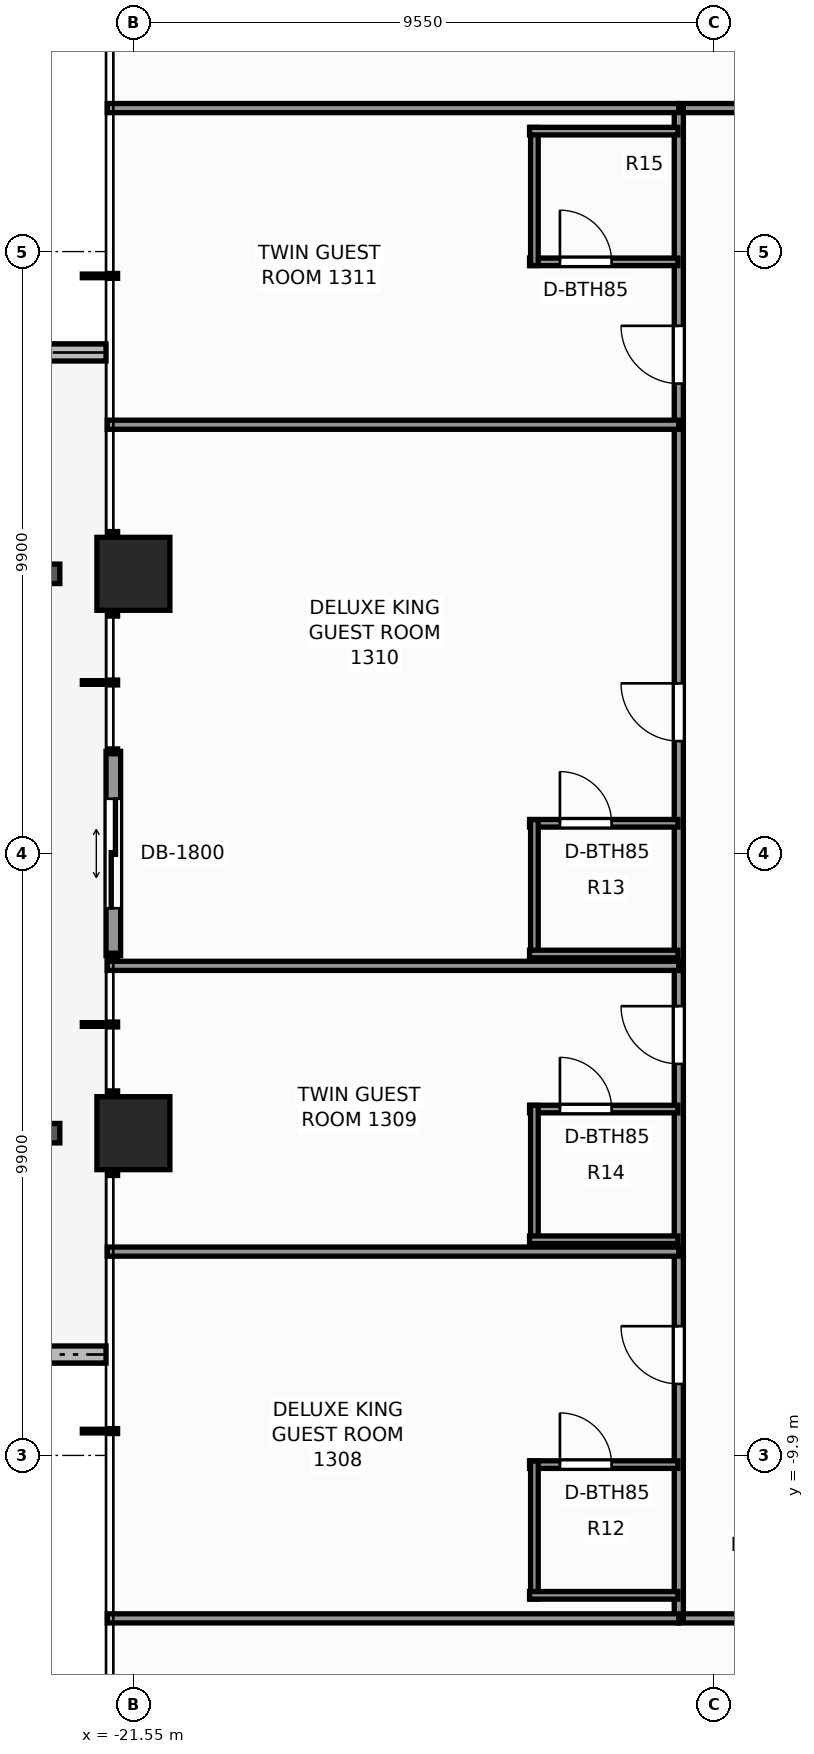
"""IFC4 building model, lengths in metres.
Left out: names, types, materials, properties, quantities, classifications, styles, units other than length and angle.
Written with IfcOpenShell. Run it as: python <this file> out.ifc"""

import sys

from ifc_helpers import new_model, si_unit, direction, frame, frame_2d, origin, origin_2d, place, context, subcontext, project, spatial, rectangle, extrude, element, fill, save


model = new_model("IFC4")
c1 = context("Model", 3, precision=1e-05, world=origin(), true_north=direction((0.0, 1.0)))
c2 = subcontext(c1, "Body", "Model", "MODEL_VIEW")
j1 = project(units=[si_unit("LENGTHUNIT", "METRE"), si_unit("PLANEANGLEUNIT", "RADIAN")], contexts=[c1])
p1 = place(None, origin())
s1 = spatial("IfcSite", under=j1, at=p1, CompositionType="ELEMENT")
p2 = place(p1, origin())
s2 = spatial("IfcBuilding", under=s1, at=p2, CompositionType="ELEMENT")
p3 = place(p2, frame((0.0, 0.0, 46.9)))
s3 = spatial("IfcBuildingStorey", under=s2, at=p3, CompositionType="ELEMENT", Elevation=46.9)
for number, where, z_axis, x_axis in (
    (1, (-21.55, -4.6, 0.0), (0.0, 0.0, 1.0), (1.0, 0.0, 0.0)),
    (2, (-21.55, 4.6, 0.0), (0.0, 0.0, 1.0), (1.0, 0.0, 0.0)),
):
    element("IfcColumn", number, at=place(p3, frame(where, z_axis=z_axis, x_axis=x_axis)), inside=s3, PredefinedType="COLUMN", context=c2, shape_type="SweptSolid", body=[
        extrude(rectangle(XDim=1.2, YDim=1.2, at=origin_2d()), origin(), (0.0, 0.0, 1.0), 3.3),
    ])
p4 = place(p3, frame((-25.214, -8.24, -0.06), z_axis=(0.0, 0.0, 1.0), x_axis=(1.0, 0.0, 0.0)))
e3 = element("IfcWall", 3, at=p4, inside=s3, PredefinedType="PARAPET", context=c2, shape_type="SweptSolid", body=[
    extrude(rectangle(XDim=3.214, YDim=0.28, at=frame_2d((1.607, 0.0))), origin(), (0.0, 0.0, 1.0), 0.42),
])
p5 = place(p3, frame((-22.0, 8.24, -0.06), z_axis=(0.0, 0.0, 1.0), x_axis=(-1.0, 0.0, 0.0)))
e4 = element("IfcWall", 4, at=p5, inside=s3, PredefinedType="PARAPET", context=c2, shape_type="SweptSolid", body=[
    extrude(rectangle(XDim=3.42, YDim=0.28, at=frame_2d((1.71, 0.0))), origin(), (0.0, 0.0, 1.0), 0.42),
])
p6 = place(p3, frame((-21.88, -1.68, 0.0), z_axis=(0.0, 0.0, 1.0), x_axis=(0.0, 1.0, 0.0)))
e5 = element("IfcWall", 5, at=p6, inside=s3, PredefinedType="STANDARD", context=c2, shape_type="SweptSolid", body=[
    extrude(rectangle(XDim=3.36, YDim=0.24, at=frame_2d((1.68, 0.0))), origin(), (0.0, 0.0, 1.0), 3.06),
])
p7 = place(p6, frame((0.78, 0.0, 0.0)))
e6 = element("IfcOpeningElement", 6, at=p7, cuts=e5, PredefinedType="OPENING", context=c2, shape_type="SweptSolid", body=[
    extrude(rectangle(XDim=1.8, YDim=2.2, at=frame_2d((0.9, 1.1))), frame((0.0, 0.13, 0.0), z_axis=(0.0, -1.0, 0.0), x_axis=(1.0, 0.0, 0.0)), (0.0, 0.0, 1.0), 0.26),
])
p8 = place(p3, frame((-12.58, -12.58, 0.0), z_axis=(0.0, 0.0, 1.0), x_axis=(1.0, 0.0, 0.0)))
e7 = element("IfcWall", 7, at=p8, inside=s3, PredefinedType="PARTITIONING", context=c2, shape_type="SweptSolid", body=[
    extrude(rectangle(XDim=25.0, YDim=0.15, at=frame_2d((12.5, 0.0))), origin(), (0.0, 0.0, 1.0), 2.272),
])
p9 = place(p8, frame((3.118, 0.0, 0.0)))
e8 = element("IfcOpeningElement", 8, at=p9, cuts=e7, PredefinedType="OPENING", context=c2, shape_type="SweptSolid", body=[
    extrude(rectangle(XDim=0.9, YDim=2.06, at=frame_2d((0.45, 1.03))), frame((0.0, 0.085, 0.0), z_axis=(0.0, -1.0, 0.0), x_axis=(1.0, 0.0, 0.0)), (0.0, 0.0, 1.0), 0.17),
])
p10 = place(p8, frame((5.454, 0.0, 0.0)))
e9 = element("IfcOpeningElement", 9, at=p10, cuts=e7, PredefinedType="OPENING", context=c2, shape_type="SweptSolid", body=[
    extrude(rectangle(XDim=0.9, YDim=2.06, at=frame_2d((0.45, 1.03))), frame((0.0, 0.085, 0.0), z_axis=(0.0, -1.0, 0.0), x_axis=(1.0, 0.0, 0.0)), (0.0, 0.0, 1.0), 0.17),
])
p11 = place(p8, frame((14.16, 0.0, 0.0)))
e10 = element("IfcOpeningElement", 10, at=p11, cuts=e7, PredefinedType="OPENING", context=c2, shape_type="SweptSolid", body=[
    extrude(rectangle(XDim=0.9, YDim=2.06, at=frame_2d((0.45, 1.03))), frame((0.0, 0.085, 0.0), z_axis=(0.0, -1.0, 0.0), x_axis=(1.0, 0.0, 0.0)), (0.0, 0.0, 1.0), 0.17),
])
p12 = place(p8, frame((20.541, 0.0, 0.0)))
e11 = element("IfcOpeningElement", 11, at=p12, cuts=e7, PredefinedType="OPENING", context=c2, shape_type="SweptSolid", body=[
    extrude(rectangle(XDim=0.9, YDim=2.06, at=frame_2d((0.45, 1.03))), frame((0.0, 0.085, 0.0), z_axis=(0.0, -1.0, 0.0), x_axis=(1.0, 0.0, 0.0)), (0.0, 0.0, 1.0), 0.17),
])
p13 = place(p3, frame((-12.58, 12.26, 0.0), z_axis=(0.0, 0.0, 1.0), x_axis=(1.0, 0.0, 0.0)))
e12 = element("IfcWall", 12, at=p13, inside=s3, PredefinedType="PARTITIONING", context=c2, shape_type="SweptSolid", body=[
    extrude(rectangle(XDim=25.0, YDim=0.15, at=frame_2d((12.5, 0.0))), origin(), (0.0, 0.0, 1.0), 2.272),
])
p14 = place(p13, frame((3.379, 0.0, 0.0)))
e13 = element("IfcOpeningElement", 13, at=p14, cuts=e12, PredefinedType="OPENING", context=c2, shape_type="SweptSolid", body=[
    extrude(rectangle(XDim=0.9, YDim=2.06, at=frame_2d((0.45, 1.03))), frame((0.0, 0.085, 0.0), z_axis=(0.0, -1.0, 0.0), x_axis=(1.0, 0.0, 0.0)), (0.0, 0.0, 1.0), 0.17),
])
p15 = place(p13, frame((10.1, 0.0, 0.0)))
e14 = element("IfcOpeningElement", 14, at=p15, cuts=e12, PredefinedType="OPENING", context=c2, shape_type="SweptSolid", body=[
    extrude(rectangle(XDim=0.9, YDim=2.06, at=frame_2d((0.45, 1.03))), frame((0.0, 0.085, 0.0), z_axis=(0.0, -1.0, 0.0), x_axis=(1.0, 0.0, 0.0)), (0.0, 0.0, 1.0), 0.17),
])
p16 = place(p13, frame((19.665, 0.0, 0.0)))
e15 = element("IfcOpeningElement", 15, at=p16, cuts=e12, PredefinedType="OPENING", context=c2, shape_type="SweptSolid", body=[
    extrude(rectangle(XDim=0.9, YDim=2.06, at=frame_2d((0.45, 1.03))), frame((0.0, 0.085, 0.0), z_axis=(0.0, -1.0, 0.0), x_axis=(1.0, 0.0, 0.0)), (0.0, 0.0, 1.0), 0.17),
])
p17 = place(p3, frame((-12.58, -12.58, 0.0), z_axis=(0.0, 0.0, 1.0), x_axis=(0.0, 1.0, 0.0)))
e16 = element("IfcWall", 16, at=p17, inside=s3, PredefinedType="PARTITIONING", context=c2, shape_type="SweptSolid", body=[
    extrude(rectangle(XDim=24.84, YDim=0.15, at=frame_2d((12.42, 0.0))), origin(), (0.0, 0.0, 1.0), 2.272),
])
p18 = place(p17, frame((3.856, 0.0, 0.0)))
e17 = element("IfcOpeningElement", 17, at=p18, cuts=e16, PredefinedType="OPENING", context=c2, shape_type="SweptSolid", body=[
    extrude(rectangle(XDim=0.95, YDim=2.06, at=frame_2d((0.475, 1.03))), frame((0.0, 0.085, 0.0), z_axis=(0.0, -1.0, 0.0), x_axis=(1.0, 0.0, 0.0)), (0.0, 0.0, 1.0), 0.17),
])
p19 = place(p17, frame((9.119, 0.0, 0.0)))
e18 = element("IfcOpeningElement", 18, at=p19, cuts=e16, PredefinedType="OPENING", context=c2, shape_type="SweptSolid", body=[
    extrude(rectangle(XDim=0.95, YDim=2.06, at=frame_2d((0.475, 1.03))), frame((0.0, 0.085, 0.0), z_axis=(0.0, -1.0, 0.0), x_axis=(1.0, 0.0, 0.0)), (0.0, 0.0, 1.0), 0.17),
])
p20 = place(p17, frame((14.428, 0.0, 0.0)))
e19 = element("IfcOpeningElement", 19, at=p20, cuts=e16, PredefinedType="OPENING", context=c2, shape_type="SweptSolid", body=[
    extrude(rectangle(XDim=0.95, YDim=2.06, at=frame_2d((0.475, 1.03))), frame((0.0, 0.085, 0.0), z_axis=(0.0, -1.0, 0.0), x_axis=(1.0, 0.0, 0.0)), (0.0, 0.0, 1.0), 0.17),
])
p21 = place(p17, frame((20.309, 0.0, 0.0)))
e20 = element("IfcOpeningElement", 20, at=p21, cuts=e16, PredefinedType="OPENING", context=c2, shape_type="SweptSolid", body=[
    extrude(rectangle(XDim=0.95, YDim=2.06, at=frame_2d((0.475, 1.03))), frame((0.0, 0.085, 0.0), z_axis=(0.0, -1.0, 0.0), x_axis=(1.0, 0.0, 0.0)), (0.0, 0.0, 1.0), 0.17),
])
for number, where, z_axis, x_axis in (
    (21, (-21.98, -12.58, 0.0), (0.0, 0.0, 1.0), (1.0, 0.0, 0.0)),
    (22, (-21.98, 12.26, 0.0), (0.0, 0.0, 1.0), (1.0, 0.0, 0.0)),
):
    element("IfcWall", number, at=place(p3, frame(where, z_axis=z_axis, x_axis=x_axis)), inside=s3, PredefinedType="PARTITIONING", context=c2, shape_type="SweptSolid", body=[
        extrude(rectangle(XDim=9.4, YDim=0.15, at=frame_2d((4.7, 0.0))), origin(), (0.0, 0.0, 1.0), 2.272),
    ])
p22 = place(p3, frame((-21.98, -6.548, 0.0), z_axis=(0.0, 0.0, 1.0), x_axis=(1.0, 0.0, 0.0)))
e23 = element("IfcWall", 23, at=p22, inside=s3, PredefinedType="PARTITIONING", context=c2, shape_type="SweptSolid", body=[
    extrude(rectangle(XDim=9.4, YDim=0.15, at=frame_2d((4.7, 0.0))), origin(), (0.0, 0.0, 1.0), 2.429),
])
p23 = place(p3, frame((-15.035, -10.051, 0.0), z_axis=(0.0, 0.0, 1.0), x_axis=(1.0, 0.0, 0.0)))
e24 = element("IfcWall", 24, at=p23, inside=s3, PredefinedType="PARTITIONING", context=c2, shape_type="SweptSolid", body=[
    extrude(rectangle(XDim=2.44, YDim=0.125, at=frame_2d((1.22, 0.0))), origin(), (0.0, 0.0, 1.0), 3.06),
])
p24 = place(p23, frame((0.5, 0.0, 0.0)))
e25 = element("IfcOpeningElement", 25, at=p24, cuts=e24, PredefinedType="OPENING", context=c2, shape_type="SweptSolid", body=[
    extrude(rectangle(XDim=0.85, YDim=2.03, at=frame_2d((0.425, 1.015))), frame((0.0, 0.073, 0.0), z_axis=(0.0, -1.0, 0.0), x_axis=(1.0, 0.0, 0.0)), (0.0, 0.0, 1.0), 0.145),
])
p25 = place(p3, frame((-14.955, -12.261, 0.0), z_axis=(0.0, 0.0, 1.0), x_axis=(0.0, 1.0, 0.0)))
e26 = element("IfcWall", 26, at=p25, inside=s3, PredefinedType="PARTITIONING", context=c2, shape_type="SweptSolid", body=[
    extrude(rectangle(XDim=2.27, YDim=0.125, at=frame_2d((1.135, 0.0))), origin(), (0.0, 0.0, 1.0), 2.272),
])
p26 = place(p3, frame((-15.035, -12.201, 0.0), z_axis=(0.0, 0.0, 1.0), x_axis=(1.0, 0.0, 0.0)))
e27 = element("IfcWall", 27, at=p26, inside=s3, PredefinedType="PARTITIONING", context=c2, shape_type="SweptSolid", body=[
    extrude(rectangle(XDim=2.44, YDim=0.125, at=frame_2d((1.22, 0.0))), origin(), (0.0, 0.0, 1.0), 3.06),
])
p27 = place(p3, frame((-21.98, -1.848, 0.0), z_axis=(0.0, 0.0, 1.0), x_axis=(1.0, 0.0, 0.0)))
e28 = element("IfcWall", 28, at=p27, inside=s3, PredefinedType="PARTITIONING", context=c2, shape_type="SweptSolid", body=[
    extrude(rectangle(XDim=9.4, YDim=0.15, at=frame_2d((4.7, 0.0))), origin(), (0.0, 0.0, 1.0), 2.429),
])
p28 = place(p3, frame((-15.035, -4.203, 0.0), z_axis=(0.0, 0.0, 1.0), x_axis=(1.0, 0.0, 0.0)))
e29 = element("IfcWall", 29, at=p28, inside=s3, PredefinedType="PARTITIONING", context=c2, shape_type="SweptSolid", body=[
    extrude(rectangle(XDim=2.44, YDim=0.125, at=frame_2d((1.22, 0.0))), origin(), (0.0, 0.0, 1.0), 3.06),
])
p29 = place(p28, frame((0.5, 0.0, 0.0)))
e30 = element("IfcOpeningElement", 30, at=p29, cuts=e29, PredefinedType="OPENING", context=c2, shape_type="SweptSolid", body=[
    extrude(rectangle(XDim=0.85, YDim=2.03, at=frame_2d((0.425, 1.015))), frame((0.0, 0.073, 0.0), z_axis=(0.0, -1.0, 0.0), x_axis=(1.0, 0.0, 0.0)), (0.0, 0.0, 1.0), 0.145),
])
p30 = place(p3, frame((-14.955, -6.413, 0.0), z_axis=(0.0, 0.0, 1.0), x_axis=(0.0, 1.0, 0.0)))
e31 = element("IfcWall", 31, at=p30, inside=s3, PredefinedType="PARTITIONING", context=c2, shape_type="SweptSolid", body=[
    extrude(rectangle(XDim=2.27, YDim=0.125, at=frame_2d((1.135, 0.0))), origin(), (0.0, 0.0, 1.0), 2.272),
])
p31 = place(p3, frame((-15.035, -6.353, 0.0), z_axis=(0.0, 0.0, 1.0), x_axis=(1.0, 0.0, 0.0)))
e32 = element("IfcWall", 32, at=p31, inside=s3, PredefinedType="PARTITIONING", context=c2, shape_type="SweptSolid", body=[
    extrude(rectangle(XDim=2.44, YDim=0.125, at=frame_2d((1.22, 0.0))), origin(), (0.0, 0.0, 1.0), 3.06),
])
p32 = place(p3, frame((-21.98, 7.052, 0.0), z_axis=(0.0, 0.0, 1.0), x_axis=(1.0, 0.0, 0.0)))
e33 = element("IfcWall", 33, at=p32, inside=s3, PredefinedType="PARTITIONING", context=c2, shape_type="SweptSolid", body=[
    extrude(rectangle(XDim=9.4, YDim=0.15, at=frame_2d((4.7, 0.0))), origin(), (0.0, 0.0, 1.0), 2.429),
])
p33 = place(p3, frame((-15.035, 0.497, 0.0), z_axis=(0.0, 0.0, 1.0), x_axis=(1.0, 0.0, 0.0)))
e34 = element("IfcWall", 34, at=p33, inside=s3, PredefinedType="PARTITIONING", context=c2, shape_type="SweptSolid", body=[
    extrude(rectangle(XDim=2.44, YDim=0.125, at=frame_2d((1.22, 0.0))), origin(), (0.0, 0.0, 1.0), 3.06),
])
p34 = place(p33, frame((0.5, 0.0, 0.0)))
e35 = element("IfcOpeningElement", 35, at=p34, cuts=e34, PredefinedType="OPENING", context=c2, shape_type="SweptSolid", body=[
    extrude(rectangle(XDim=0.85, YDim=2.03, at=frame_2d((0.425, 1.015))), frame((0.0, 0.073, 0.0), z_axis=(0.0, -1.0, 0.0), x_axis=(1.0, 0.0, 0.0)), (0.0, 0.0, 1.0), 0.145),
])
p35 = place(p3, frame((-14.955, -1.713, 0.0), z_axis=(0.0, 0.0, 1.0), x_axis=(0.0, 1.0, 0.0)))
e36 = element("IfcWall", 36, at=p35, inside=s3, PredefinedType="PARTITIONING", context=c2, shape_type="SweptSolid", body=[
    extrude(rectangle(XDim=2.27, YDim=0.125, at=frame_2d((1.135, 0.0))), origin(), (0.0, 0.0, 1.0), 2.585),
])
p36 = place(p3, frame((-15.035, -1.653, 0.0), z_axis=(0.0, 0.0, 1.0), x_axis=(1.0, 0.0, 0.0)))
e37 = element("IfcWall", 37, at=p36, inside=s3, PredefinedType="PARTITIONING", context=c2, shape_type="SweptSolid", body=[
    extrude(rectangle(XDim=2.44, YDim=0.125, at=frame_2d((1.22, 0.0))), origin(), (0.0, 0.0, 1.0), 3.06),
])
p37 = place(p3, frame((-15.035, 9.731, 0.0), z_axis=(0.0, 0.0, 1.0), x_axis=(1.0, 0.0, 0.0)))
e38 = element("IfcWall", 38, at=p37, inside=s3, PredefinedType="PARTITIONING", context=c2, shape_type="SweptSolid", body=[
    extrude(rectangle(XDim=2.44, YDim=0.125, at=frame_2d((1.22, 0.0))), origin(), (0.0, 0.0, 1.0), 3.06),
])
p38 = place(p37, frame((0.5, 0.0, 0.0)))
e39 = element("IfcOpeningElement", 39, at=p38, cuts=e38, PredefinedType="OPENING", context=c2, shape_type="SweptSolid", body=[
    extrude(rectangle(XDim=0.85, YDim=2.03, at=frame_2d((0.425, 1.015))), frame((0.0, 0.073, 0.0), z_axis=(0.0, -1.0, 0.0), x_axis=(1.0, 0.0, 0.0)), (0.0, 0.0, 1.0), 0.145),
])
p39 = place(p3, frame((-14.955, 9.671, 0.0), z_axis=(0.0, 0.0, 1.0), x_axis=(0.0, 1.0, 0.0)))
e40 = element("IfcWall", 40, at=p39, inside=s3, PredefinedType="PARTITIONING", context=c2, shape_type="SweptSolid", body=[
    extrude(rectangle(XDim=2.27, YDim=0.125, at=frame_2d((1.135, 0.0))), origin(), (0.0, 0.0, 1.0), 2.272),
])
p40 = place(p3, frame((-15.035, 11.881, 0.0), z_axis=(0.0, 0.0, 1.0), x_axis=(1.0, 0.0, 0.0)))
e41 = element("IfcWall", 41, at=p40, inside=s3, PredefinedType="PARTITIONING", context=c2, shape_type="SweptSolid", body=[
    extrude(rectangle(XDim=2.44, YDim=0.125, at=frame_2d((1.22, 0.0))), origin(), (0.0, 0.0, 1.0), 2.272),
])
p41 = place(p7, origin())
e42 = element("IfcDoor", 42, at=p41, inside=s3, OperationType="DOUBLE_DOOR_SLIDING", PredefinedType="DOOR", context=c2, shape_type="SweptSolid", body=[
    extrude(rectangle(XDim=1.8, YDim=2.2, at=frame_2d((0.9, 1.1))), frame((0.0, 0.025, 0.0), z_axis=(0.0, -1.0, 0.0), x_axis=(1.0, 0.0, 0.0)), (0.0, 0.0, 1.0), 0.05),
])
fill(e6, e42)
p42 = place(p24, origin())
e43 = element("IfcDoor", 43, at=p42, inside=s3, OperationType="SINGLE_SWING_LEFT", PredefinedType="DOOR", context=c2, shape_type="SweptSolid", body=[
    extrude(rectangle(XDim=0.85, YDim=2.03, at=frame_2d((0.425, 1.015))), frame((0.0, 0.025, 0.0), z_axis=(0.0, -1.0, 0.0), x_axis=(1.0, 0.0, 0.0)), (0.0, 0.0, 1.0), 0.05),
])
fill(e25, e43)
p43 = place(p18, origin())
e44 = element("IfcDoor", 44, at=p43, inside=s3, OperationType="SINGLE_SWING_RIGHT", PredefinedType="DOOR", context=c2, shape_type="SweptSolid", body=[
    extrude(rectangle(XDim=0.95, YDim=2.06, at=frame_2d((0.475, 1.03))), frame((0.0, 0.025, 0.0), z_axis=(0.0, -1.0, 0.0), x_axis=(1.0, 0.0, 0.0)), (0.0, 0.0, 1.0), 0.05),
])
fill(e17, e44)
p44 = place(p29, origin())
e45 = element("IfcDoor", 45, at=p44, inside=s3, OperationType="SINGLE_SWING_LEFT", PredefinedType="DOOR", context=c2, shape_type="SweptSolid", body=[
    extrude(rectangle(XDim=0.85, YDim=2.03, at=frame_2d((0.425, 1.015))), frame((0.0, 0.025, 0.0), z_axis=(0.0, -1.0, 0.0), x_axis=(1.0, 0.0, 0.0)), (0.0, 0.0, 1.0), 0.05),
])
fill(e30, e45)
p45 = place(p19, origin())
e46 = element("IfcDoor", 46, at=p45, inside=s3, OperationType="SINGLE_SWING_RIGHT", PredefinedType="DOOR", context=c2, shape_type="SweptSolid", body=[
    extrude(rectangle(XDim=0.95, YDim=2.06, at=frame_2d((0.475, 1.03))), frame((0.0, 0.025, 0.0), z_axis=(0.0, -1.0, 0.0), x_axis=(1.0, 0.0, 0.0)), (0.0, 0.0, 1.0), 0.05),
])
fill(e18, e46)
p46 = place(p34, origin())
e47 = element("IfcDoor", 47, at=p46, inside=s3, OperationType="SINGLE_SWING_LEFT", PredefinedType="DOOR", context=c2, shape_type="SweptSolid", body=[
    extrude(rectangle(XDim=0.85, YDim=2.03, at=frame_2d((0.425, 1.015))), frame((0.0, 0.025, 0.0), z_axis=(0.0, -1.0, 0.0), x_axis=(1.0, 0.0, 0.0)), (0.0, 0.0, 1.0), 0.05),
])
fill(e35, e47)
p47 = place(p20, origin())
e48 = element("IfcDoor", 48, at=p47, inside=s3, OperationType="SINGLE_SWING_RIGHT", PredefinedType="DOOR", context=c2, shape_type="SweptSolid", body=[
    extrude(rectangle(XDim=0.95, YDim=2.06, at=frame_2d((0.475, 1.03))), frame((0.0, 0.025, 0.0), z_axis=(0.0, -1.0, 0.0), x_axis=(1.0, 0.0, 0.0)), (0.0, 0.0, 1.0), 0.05),
])
fill(e19, e48)
p48 = place(p38, origin())
e49 = element("IfcDoor", 49, at=p48, inside=s3, OperationType="SINGLE_SWING_LEFT", PredefinedType="DOOR", context=c2, shape_type="SweptSolid", body=[
    extrude(rectangle(XDim=0.85, YDim=2.03, at=frame_2d((0.425, 1.015))), frame((0.0, 0.025, 0.0), z_axis=(0.0, -1.0, 0.0), x_axis=(1.0, 0.0, 0.0)), (0.0, 0.0, 1.0), 0.05),
])
fill(e39, e49)
p49 = place(p21, origin())
e50 = element("IfcDoor", 50, at=p49, inside=s3, OperationType="SINGLE_SWING_RIGHT", PredefinedType="DOOR", context=c2, shape_type="SweptSolid", body=[
    extrude(rectangle(XDim=0.95, YDim=2.06, at=frame_2d((0.475, 1.03))), frame((0.0, 0.025, 0.0), z_axis=(0.0, -1.0, 0.0), x_axis=(1.0, 0.0, 0.0)), (0.0, 0.0, 1.0), 0.05),
])
fill(e20, e50)
save(model, sys.argv[1])
